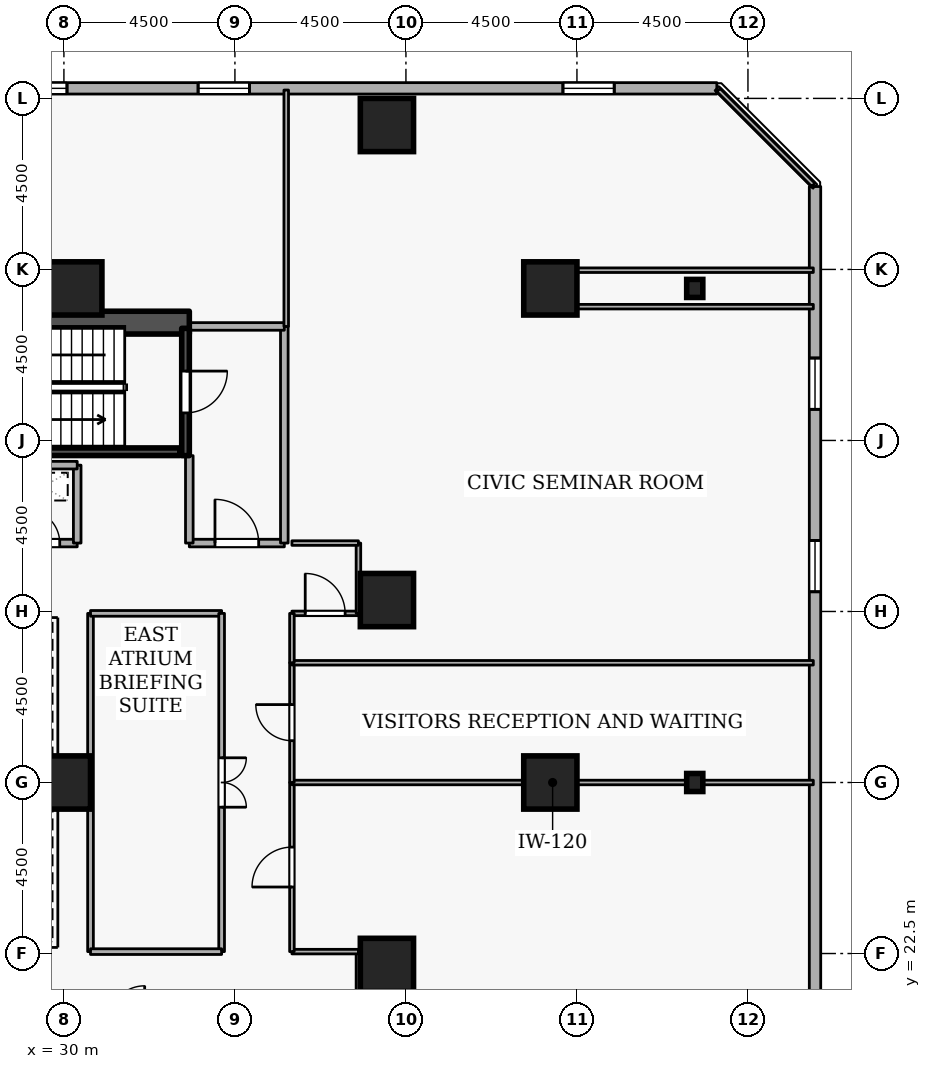
"""IFC4 building model, lengths in metres.
Left out: names, types, materials, properties, quantities, classifications, styles, units other than length and angle.
Written with IfcOpenShell. Run it as: python <this file> out.ifc"""

import sys

from ifc_helpers import new_model, si_unit, direction, frame, frame_2d, origin, origin_2d, place, context, subcontext, project, spatial, rectangle, i_section, extrude, element, fill, save


model = new_model("IFC4")
c1 = context("Model", 3, precision=1e-05, world=origin(), true_north=direction((0.0, 1.0)))
c2 = subcontext(c1, "Body", "Model", "MODEL_VIEW")
j1 = project(units=[si_unit("LENGTHUNIT", "METRE"), si_unit("PLANEANGLEUNIT", "RADIAN")], contexts=[c1])
p1 = place(None, origin())
s1 = spatial("IfcSite", under=j1, at=p1, CompositionType="ELEMENT")
p2 = place(p1, origin())
s2 = spatial("IfcBuilding", under=s1, at=p2, CompositionType="ELEMENT")
p3 = place(p2, frame((0.0, 0.0, 68.1)))
s3 = spatial("IfcBuildingStorey", under=s2, at=p3, CompositionType="ELEMENT", Elevation=68.1)
p4 = place(p3, frame((17.7, 39.1, 0.0), z_axis=(0.0, 0.0, 1.0), x_axis=(1.0, 0.0, 0.0)))
e1 = element("IfcWall", 1, at=p4, inside=s3, PredefinedType="SHEAR", context=c2, shape_type="SweptSolid", body=[
    extrude(rectangle(XDim=15.6, YDim=0.6, at=frame_2d((7.8, 0.0))), origin(), (0.0, 0.0, 1.0), 3.6),
])
for number, where, z_axis, x_axis in (
    (2, (42.8, 27.0, 0.0), (0.0, 0.0, 1.0), (1.0, 0.0, 0.0)),
    (3, (42.8, 40.0, 0.0), (0.0, 0.0, 1.0), (1.0, 0.0, 0.0)),
    (4, (38.5, 44.3, 0.0), (0.0, 0.0, 1.0), (1.0, 0.0, 0.0)),
    (5, (38.5, 22.2, 0.0), (0.0, 0.0, 1.0), (1.0, 0.0, 0.0)),
    (6, (38.5, 31.8, 0.0), (0.0, 0.0, 1.0), (1.0, 0.0, 0.0)),
    (7, (30.3, 40.0, 0.0), (0.0, 0.0, 1.0), (1.0, 0.0, 0.0)),
    (8, (30.0, 27.0, 0.0), (0.0, 0.0, 1.0), (1.0, 0.0, 0.0)),
):
    element("IfcColumn", number, at=place(p3, frame(where, z_axis=z_axis, x_axis=x_axis)), inside=s3, PredefinedType="COLUMN", context=c2, shape_type="SweptSolid", body=[
        extrude(rectangle(XDim=1.4, YDim=1.4, at=origin_2d()), origin(), (0.0, 0.0, 1.0), 3.6),
    ])
for number, where, z_axis, x_axis in (
    (9, (46.6, 27.0, 0.0), (0.0, 0.0, 1.0), (1.0, 0.0, 0.0)),
    (10, (46.6, 40.0, 0.0), (0.0, 0.0, 1.0), (1.0, 0.0, 0.0)),
):
    element("IfcColumn", number, at=place(p3, frame(where, z_axis=z_axis, x_axis=x_axis)), inside=s3, PredefinedType="COLUMN", context=c2, shape_type="SweptSolid", body=[
        extrude(i_section(OverallWidth=0.424, OverallDepth=0.475, WebThickness=0.048, FlangeThickness=0.077, FilletRadius=0.015, at=origin_2d()), origin(), (0.0, 0.0, 1.0), 3.6),
    ])
p5 = place(p3, frame((49.765, 5.319, 0.0), z_axis=(0.0, 0.0, 1.0), x_axis=(0.0, 1.0, 0.0)))
e11 = element("IfcWall", 11, at=p5, inside=s3, PredefinedType="STANDARD", context=c2, shape_type="SweptSolid", body=[
    extrude(rectangle(XDim=37.362, YDim=0.3, at=frame_2d((18.681, 0.0))), origin(), (0.0, 0.0, 1.0), 2.66),
])
p6 = place(p5, frame((2.7, 0.0, 0.72)))
e12 = element("IfcOpeningElement", 12, at=p6, cuts=e11, PredefinedType="OPENING", context=c2, shape_type="SweptSolid", body=[
    extrude(rectangle(XDim=1.35, YDim=1.05, at=frame_2d((0.675, 0.525))), frame((0.0, 0.16, 0.0), z_axis=(0.0, -1.0, 0.0), x_axis=(1.0, 0.0, 0.0)), (0.0, 0.0, 1.0), 0.32),
])
p7 = place(p5, frame((12.3, 0.0, 0.72)))
e13 = element("IfcOpeningElement", 13, at=p7, cuts=e11, PredefinedType="OPENING", context=c2, shape_type="SweptSolid", body=[
    extrude(rectangle(XDim=1.35, YDim=1.05, at=frame_2d((0.675, 0.525))), frame((0.0, 0.16, 0.0), z_axis=(0.0, -1.0, 0.0), x_axis=(1.0, 0.0, 0.0)), (0.0, 0.0, 1.0), 0.32),
])
p8 = place(p5, frame((26.7, 0.0, 0.72)))
e14 = element("IfcOpeningElement", 14, at=p8, cuts=e11, PredefinedType="OPENING", context=c2, shape_type="SweptSolid", body=[
    extrude(rectangle(XDim=1.35, YDim=1.05, at=frame_2d((0.675, 0.525))), frame((0.0, 0.16, 0.0), z_axis=(0.0, -1.0, 0.0), x_axis=(1.0, 0.0, 0.0)), (0.0, 0.0, 1.0), 0.32),
])
p9 = place(p5, frame((31.5, 0.0, 0.72)))
e15 = element("IfcOpeningElement", 15, at=p9, cuts=e11, PredefinedType="OPENING", context=c2, shape_type="SweptSolid", body=[
    extrude(rectangle(XDim=1.35, YDim=1.05, at=frame_2d((0.675, 0.525))), frame((0.0, 0.16, 0.0), z_axis=(0.0, -1.0, 0.0), x_axis=(1.0, 0.0, 0.0)), (0.0, 0.0, 1.0), 0.32),
])
p10 = place(p3, frame((47.181, 45.265, 0.0), z_axis=(0.0, 0.0, 1.0), x_axis=(-1.0, 0.0, 0.0)))
e16 = element("IfcWall", 16, at=p10, inside=s3, PredefinedType="STANDARD", context=c2, shape_type="SweptSolid", body=[
    extrude(rectangle(XDim=37.362, YDim=0.3, at=frame_2d((18.681, 0.0))), origin(), (0.0, 0.0, 1.0), 2.66),
])
p11 = place(p10, frame((2.7, 0.0, 0.72)))
e17 = element("IfcOpeningElement", 17, at=p11, cuts=e16, PredefinedType="OPENING", context=c2, shape_type="SweptSolid", body=[
    extrude(rectangle(XDim=1.35, YDim=1.05, at=frame_2d((0.675, 0.525))), frame((0.0, 0.16, 0.0), z_axis=(0.0, -1.0, 0.0), x_axis=(1.0, 0.0, 0.0)), (0.0, 0.0, 1.0), 0.32),
])
p12 = place(p10, frame((12.3, 0.0, 0.72)))
e18 = element("IfcOpeningElement", 18, at=p12, cuts=e16, PredefinedType="OPENING", context=c2, shape_type="SweptSolid", body=[
    extrude(rectangle(XDim=1.35, YDim=1.05, at=frame_2d((0.675, 0.525))), frame((0.0, 0.16, 0.0), z_axis=(0.0, -1.0, 0.0), x_axis=(1.0, 0.0, 0.0)), (0.0, 0.0, 1.0), 0.32),
])
p13 = place(p10, frame((17.1, 0.0, 0.72)))
e19 = element("IfcOpeningElement", 19, at=p13, cuts=e16, PredefinedType="OPENING", context=c2, shape_type="SweptSolid", body=[
    extrude(rectangle(XDim=1.35, YDim=1.05, at=frame_2d((0.675, 0.525))), frame((0.0, 0.16, 0.0), z_axis=(0.0, -1.0, 0.0), x_axis=(1.0, 0.0, 0.0)), (0.0, 0.0, 1.0), 0.32),
])
p14 = place(p10, frame((26.7, 0.0, 0.72)))
e20 = element("IfcOpeningElement", 20, at=p14, cuts=e16, PredefinedType="OPENING", context=c2, shape_type="SweptSolid", body=[
    extrude(rectangle(XDim=1.35, YDim=1.05, at=frame_2d((0.675, 0.525))), frame((0.0, 0.16, 0.0), z_axis=(0.0, -1.0, 0.0), x_axis=(1.0, 0.0, 0.0)), (0.0, 0.0, 1.0), 0.32),
])
p15 = place(p10, frame((31.5, 0.0, 0.72)))
e21 = element("IfcOpeningElement", 21, at=p15, cuts=e16, PredefinedType="OPENING", context=c2, shape_type="SweptSolid", body=[
    extrude(rectangle(XDim=1.35, YDim=1.05, at=frame_2d((0.675, 0.525))), frame((0.0, 0.16, 0.0), z_axis=(0.0, -1.0, 0.0), x_axis=(1.0, 0.0, 0.0)), (0.0, 0.0, 1.0), 0.32),
])
p16 = place(p3, frame((33.2, 38.95, 0.0), z_axis=(0.0, 0.0, 1.0), x_axis=(0.0, -1.0, 0.0)))
e22 = element("IfcWall", 22, at=p16, inside=s3, PredefinedType="SHEAR", context=c2, shape_type="SweptSolid", body=[
    extrude(rectangle(XDim=3.35, YDim=0.2, at=frame_2d((1.675, 0.0))), origin(), (0.0, 0.0, 1.0), 3.6),
])
p17 = place(p16, frame((1.125, 0.0, 0.0)))
e23 = element("IfcOpeningElement", 23, at=p17, cuts=e22, PredefinedType="OPENING", context=c2, shape_type="SweptSolid", body=[
    extrude(rectangle(XDim=1.1, YDim=2.1, at=frame_2d((0.55, 1.05))), frame((0.0, 0.11, 0.0), z_axis=(0.0, -1.0, 0.0), x_axis=(1.0, 0.0, 0.0)), (0.0, 0.0, 1.0), 0.22),
])
p18 = place(p3, frame((25.95, 35.703, 0.0), z_axis=(0.0, 0.0, 1.0), x_axis=(1.0, 0.0, 0.0)))
e24 = element("IfcWall", 24, at=p18, inside=s3, PredefinedType="SHEAR", context=c2, shape_type="SweptSolid", body=[
    extrude(rectangle(XDim=7.1, YDim=0.2, at=frame_2d((3.55, 0.0))), origin(), (0.0, 0.0, 1.0), 3.6),
])
p19 = place(p3, frame((33.3, 33.3, 0.0), z_axis=(0.0, 0.0, 1.0), x_axis=(1.0, 0.0, 0.0)))
e25 = element("IfcWall", 25, at=p19, inside=s3, PredefinedType="STANDARD", context=c2, shape_type="SweptSolid", body=[
    extrude(rectangle(XDim=2.5, YDim=0.2, at=frame_2d((1.25, 0.0))), origin(), (0.0, 0.0, 1.0), 3.26),
])
p20 = place(p19, frame((0.675, 0.0, 0.0)))
e26 = element("IfcOpeningElement", 26, at=p20, cuts=e25, PredefinedType="OPENING", context=c2, shape_type="SweptSolid", body=[
    extrude(rectangle(XDim=1.15, YDim=2.1, at=frame_2d((0.575, 1.05))), frame((0.0, 0.11, 0.0), z_axis=(0.0, -1.0, 0.0), x_axis=(1.0, 0.0, 0.0)), (0.0, 0.0, 1.0), 0.22),
])
p21 = place(p3, frame((35.8, 33.3, 0.0), z_axis=(0.0, 0.0, 1.0), x_axis=(0.0, 1.0, 0.0)))
e27 = element("IfcWall", 27, at=p21, inside=s3, PredefinedType="STANDARD", context=c2, shape_type="SweptSolid", body=[
    extrude(rectangle(XDim=5.7, YDim=0.2, at=frame_2d((2.85, 0.0))), origin(), (0.0, 0.0, 1.0), 3.26),
])
p22 = place(p3, frame((35.8, 39.0, 0.0), z_axis=(0.0, 0.0, 1.0), x_axis=(-1.0, 0.0, 0.0)))
e28 = element("IfcWall", 28, at=p22, inside=s3, PredefinedType="STANDARD", context=c2, shape_type="SweptSolid", body=[
    extrude(rectangle(XDim=2.5, YDim=0.2, at=frame_2d((1.25, 0.0))), origin(), (0.0, 0.0, 1.0), 3.26),
])
p23 = place(p3, frame((33.3, 35.6, 0.0), z_axis=(0.0, 0.0, 1.0), x_axis=(0.0, -1.0, 0.0)))
e29 = element("IfcWall", 29, at=p23, inside=s3, PredefinedType="STANDARD", context=c2, shape_type="SweptSolid", body=[
    extrude(rectangle(XDim=2.3, YDim=0.2, at=frame_2d((1.15, 0.0))), origin(), (0.0, 0.0, 1.0), 2.465),
])
p24 = place(p3, frame((28.55, 33.3, 0.0), z_axis=(0.0, 0.0, 1.0), x_axis=(1.0, 0.0, 0.0)))
e30 = element("IfcWall", 30, at=p24, inside=s3, PredefinedType="STANDARD", context=c2, shape_type="SweptSolid", body=[
    extrude(rectangle(XDim=1.8, YDim=0.2, at=frame_2d((0.9, 0.0))), origin(), (0.0, 0.0, 1.0), 3.26),
])
p25 = place(p24, frame((0.46, 0.0, 0.0)))
e31 = element("IfcOpeningElement", 31, at=p25, cuts=e30, PredefinedType="OPENING", context=c2, shape_type="SweptSolid", body=[
    extrude(rectangle(XDim=0.88, YDim=2.04, at=frame_2d((0.44, 1.02))), frame((0.0, 0.11, 0.0), z_axis=(0.0, -1.0, 0.0), x_axis=(1.0, 0.0, 0.0)), (0.0, 0.0, 1.0), 0.22),
])
p26 = place(p3, frame((30.35, 33.3, 0.0), z_axis=(0.0, 0.0, 1.0), x_axis=(0.0, 1.0, 0.0)))
e32 = element("IfcWall", 32, at=p26, inside=s3, PredefinedType="STANDARD", context=c2, shape_type="SweptSolid", body=[
    extrude(rectangle(XDim=2.05, YDim=0.2, at=frame_2d((1.025, 0.0))), origin(), (0.0, 0.0, 1.0), 3.26),
])
p27 = place(p3, frame((30.35, 35.35, 0.0), z_axis=(0.0, 0.0, 1.0), x_axis=(-1.0, 0.0, 0.0)))
e33 = element("IfcWall", 33, at=p27, inside=s3, PredefinedType="STANDARD", context=c2, shape_type="SweptSolid", body=[
    extrude(rectangle(XDim=1.8, YDim=0.2, at=frame_2d((0.9, 0.0))), origin(), (0.0, 0.0, 1.0), 3.26),
])
p28 = place(p3, frame((37.75, 20.7, 0.0), z_axis=(0.0, 0.0, 1.0), x_axis=(0.0, 1.0, 0.0)))
e34 = element("IfcWall", 34, at=p28, inside=s3, PredefinedType="PARTITIONING", context=c2, shape_type="SweptSolid", body=[
    extrude(rectangle(XDim=1.85, YDim=0.12, at=frame_2d((0.925, 0.0))), origin(), (0.0, 0.0, 1.0), 3.26),
])
p29 = place(p3, frame((37.75, 22.55, 0.0), z_axis=(0.0, 0.0, 1.0), x_axis=(-1.0, 0.0, 0.0)))
e35 = element("IfcWall", 35, at=p29, inside=s3, PredefinedType="PARTITIONING", context=c2, shape_type="SweptSolid", body=[
    extrude(rectangle(XDim=1.75, YDim=0.12, at=frame_2d((0.875, 0.0))), origin(), (0.0, 0.0, 1.0), 3.26),
])
p30 = place(p3, frame((36.0, 22.55, 0.0), z_axis=(0.0, 0.0, 1.0), x_axis=(0.0, 1.0, 0.0)))
e36 = element("IfcWall", 36, at=p30, inside=s3, PredefinedType="PARTITIONING", context=c2, shape_type="SweptSolid", body=[
    extrude(rectangle(XDim=4.45, YDim=0.12, at=frame_2d((2.225, 0.0))), origin(), (0.0, 0.0, 1.0), 3.26),
])
p31 = place(p30, frame((1.7, 0.0, 0.0)))
e37 = element("IfcOpeningElement", 37, at=p31, cuts=e36, PredefinedType="OPENING", context=c2, shape_type="SweptSolid", body=[
    extrude(rectangle(XDim=1.05, YDim=2.1, at=frame_2d((0.525, 1.05))), frame((0.0, 0.07, 0.0), z_axis=(0.0, -1.0, 0.0), x_axis=(1.0, 0.0, 0.0)), (0.0, 0.0, 1.0), 0.14),
])
p32 = place(p3, frame((36.0, 27.0, 0.0), z_axis=(0.0, 0.0, 1.0), x_axis=(1.0, 0.0, 0.0)))
e38 = element("IfcWall", 38, at=p32, inside=s3, PredefinedType="PARTITIONING", context=c2, shape_type="SweptSolid", body=[
    extrude(rectangle(XDim=13.72, YDim=0.12, at=frame_2d((6.86, 0.0))), origin(), (0.0, 0.0, 1.0), 2.798),
])
p33 = place(p3, frame((36.0, 27.0, 0.0), z_axis=(0.0, 0.0, 1.0), x_axis=(0.0, 1.0, 0.0)))
e39 = element("IfcWall", 39, at=p33, inside=s3, PredefinedType="PARTITIONING", context=c2, shape_type="SweptSolid", body=[
    extrude(rectangle(XDim=3.15, YDim=0.12, at=frame_2d((1.575, 0.0))), origin(), (0.0, 0.0, 1.0), 3.26),
])
p34 = place(p33, frame((1.1, 0.0, 0.0)))
e40 = element("IfcOpeningElement", 40, at=p34, cuts=e39, PredefinedType="OPENING", context=c2, shape_type="SweptSolid", body=[
    extrude(rectangle(XDim=0.95, YDim=2.1, at=frame_2d((0.475, 1.05))), frame((0.0, 0.07, 0.0), z_axis=(0.0, -1.0, 0.0), x_axis=(1.0, 0.0, 0.0)), (0.0, 0.0, 1.0), 0.14),
])
p35 = place(p3, frame((36.0, 30.15, 0.0), z_axis=(0.0, 0.0, 1.0), x_axis=(1.0, 0.0, 0.0)))
e41 = element("IfcWall", 41, at=p35, inside=s3, PredefinedType="PARTITIONING", context=c2, shape_type="SweptSolid", body=[
    extrude(rectangle(XDim=13.72, YDim=0.12, at=frame_2d((6.86, 0.0))), origin(), (0.0, 0.0, 1.0), 3.26),
])
p36 = place(p3, frame((36.0, 31.45, 0.0), z_axis=(0.0, 0.0, 1.0), x_axis=(1.0, 0.0, 0.0)))
e42 = element("IfcWall", 42, at=p36, inside=s3, PredefinedType="PARTITIONING", context=c2, shape_type="SweptSolid", body=[
    extrude(rectangle(XDim=1.75, YDim=0.12, at=frame_2d((0.875, 0.0))), origin(), (0.0, 0.0, 1.0), 3.26),
])
p37 = place(p36, frame((0.35, 0.0, 0.0)))
e43 = element("IfcOpeningElement", 43, at=p37, cuts=e42, PredefinedType="OPENING", context=c2, shape_type="SweptSolid", body=[
    extrude(rectangle(XDim=1.05, YDim=2.1, at=frame_2d((0.525, 1.05))), frame((0.0, 0.07, 0.0), z_axis=(0.0, -1.0, 0.0), x_axis=(1.0, 0.0, 0.0)), (0.0, 0.0, 1.0), 0.14),
])
p38 = place(p3, frame((37.75, 31.45, 0.0), z_axis=(0.0, 0.0, 1.0), x_axis=(0.0, 1.0, 0.0)))
e44 = element("IfcWall", 44, at=p38, inside=s3, PredefinedType="PARTITIONING", context=c2, shape_type="SweptSolid", body=[
    extrude(rectangle(XDim=1.85, YDim=0.12, at=frame_2d((0.925, 0.0))), origin(), (0.0, 0.0, 1.0), 3.26),
])
p39 = place(p3, frame((37.75, 33.3, 0.0), z_axis=(0.0, 0.0, 1.0), x_axis=(-1.0, 0.0, 0.0)))
e45 = element("IfcWall", 45, at=p39, inside=s3, PredefinedType="PARTITIONING", context=c2, shape_type="SweptSolid", body=[
    extrude(rectangle(XDim=1.75, YDim=0.12, at=frame_2d((0.875, 0.0))), origin(), (0.0, 0.0, 1.0), 3.26),
])
p40 = place(p3, frame((35.85, 39.0, 0.0), z_axis=(0.0, 0.0, 1.0), x_axis=(0.0, 1.0, 0.0)))
e46 = element("IfcWall", 46, at=p40, inside=s3, PredefinedType="PARTITIONING", context=c2, shape_type="SweptSolid", body=[
    extrude(rectangle(XDim=6.22, YDim=0.12, at=frame_2d((3.11, 0.0))), origin(), (0.0, 0.0, 1.0), 3.26),
])
p41 = place(p3, frame((47.225, 45.22, 0.0), z_axis=(0.0, 0.0, 1.0), x_axis=(0.707106781187, -0.707106781187, 0.0)))
e47 = element("IfcWall", 47, at=p41, inside=s3, PredefinedType="PARTITIONING", context=c2, shape_type="SweptSolid", body=[
    extrude(rectangle(XDim=3.528, YDim=0.12, at=frame_2d((1.764, 0.0))), origin(), (0.0, 0.0, 1.0), 3.26),
])
p42 = place(p3, frame((49.72, 40.48, 0.0), z_axis=(0.0, 0.0, 1.0), x_axis=(-1.0, 0.0, 0.0)))
e48 = element("IfcWall", 48, at=p42, inside=s3, PredefinedType="PARTITIONING", context=c2, shape_type="SweptSolid", body=[
    extrude(rectangle(XDim=6.92, YDim=0.12, at=frame_2d((3.46, 0.0))), origin(), (0.0, 0.0, 1.0), 2.815),
])
p43 = place(p3, frame((42.8, 39.52, 0.0), z_axis=(0.0, 0.0, 1.0), x_axis=(1.0, 0.0, 0.0)))
e49 = element("IfcWall", 49, at=p43, inside=s3, PredefinedType="PARTITIONING", context=c2, shape_type="SweptSolid", body=[
    extrude(rectangle(XDim=6.92, YDim=0.12, at=frame_2d((3.46, 0.0))), origin(), (0.0, 0.0, 1.0), 3.26),
])
p44 = place(p3, frame((36.0, 30.15, 0.0), z_axis=(0.0, 0.0, 1.0), x_axis=(0.0, 1.0, 0.0)))
e50 = element("IfcWall", 50, at=p44, inside=s3, PredefinedType="PARTITIONING", context=c2, shape_type="SweptSolid", body=[
    extrude(rectangle(XDim=1.3, YDim=0.12, at=frame_2d((0.65, 0.0))), origin(), (0.0, 0.0, 1.0), 3.26),
])
p45 = place(p3, frame((30.7, 22.55, 0.0), z_axis=(0.0, 0.0, 1.0), x_axis=(0.0, 1.0, 0.0)))
e51 = element("IfcWall", 51, at=p45, inside=s3, PredefinedType="PARTITIONING", context=c2, shape_type="SweptSolid", body=[
    extrude(rectangle(XDim=8.9, YDim=0.15, at=frame_2d((4.45, 0.0))), origin(), (0.0, 0.0, 1.0), 3.26),
])
p46 = place(p3, frame((30.7, 31.45, 0.0), z_axis=(0.0, 0.0, 1.0), x_axis=(1.0, 0.0, 0.0)))
e52 = element("IfcWall", 52, at=p46, inside=s3, PredefinedType="PARTITIONING", context=c2, shape_type="SweptSolid", body=[
    extrude(rectangle(XDim=3.45, YDim=0.15, at=frame_2d((1.725, 0.0))), origin(), (0.0, 0.0, 1.0), 3.26),
])
p47 = place(p3, frame((34.15, 31.45, 0.0), z_axis=(0.0, 0.0, 1.0), x_axis=(0.0, -1.0, 0.0)))
e53 = element("IfcWall", 53, at=p47, inside=s3, PredefinedType="PARTITIONING", context=c2, shape_type="SweptSolid", body=[
    extrude(rectangle(XDim=8.9, YDim=0.15, at=frame_2d((4.45, 0.0))), origin(), (0.0, 0.0, 1.0), 3.26),
])
p48 = place(p47, frame((3.8, 0.0, 0.0)))
e54 = element("IfcOpeningElement", 54, at=p48, cuts=e53, PredefinedType="OPENING", context=c2, shape_type="SweptSolid", body=[
    extrude(rectangle(XDim=1.3, YDim=2.12, at=frame_2d((0.65, 1.06))), frame((0.0, 0.085, 0.0), z_axis=(0.0, -1.0, 0.0), x_axis=(1.0, 0.0, 0.0)), (0.0, 0.0, 1.0), 0.17),
])
p49 = place(p3, frame((34.15, 22.55, 0.0), z_axis=(0.0, 0.0, 1.0), x_axis=(-1.0, 0.0, 0.0)))
e55 = element("IfcWall", 55, at=p49, inside=s3, PredefinedType="PARTITIONING", context=c2, shape_type="SweptSolid", body=[
    extrude(rectangle(XDim=3.45, YDim=0.15, at=frame_2d((1.725, 0.0))), origin(), (0.0, 0.0, 1.0), 3.26),
])
p50 = place(p8, origin())
e56 = element("IfcWindow", 56, at=p50, inside=s3, PartitioningType="SINGLE_PANEL", PredefinedType="WINDOW", context=c2, shape_type="SweptSolid", body=[
    extrude(rectangle(XDim=1.35, YDim=1.05, at=frame_2d((0.675, 0.525))), frame((0.0, 0.03, 0.0), z_axis=(0.0, -1.0, 0.0), x_axis=(1.0, 0.0, 0.0)), (0.0, 0.0, 1.0), 0.06),
])
fill(e14, e56)
p51 = place(p9, origin())
e57 = element("IfcWindow", 57, at=p51, inside=s3, PartitioningType="SINGLE_PANEL", PredefinedType="WINDOW", context=c2, shape_type="SweptSolid", body=[
    extrude(rectangle(XDim=1.35, YDim=1.05, at=frame_2d((0.675, 0.525))), frame((0.0, 0.03, 0.0), z_axis=(0.0, -1.0, 0.0), x_axis=(1.0, 0.0, 0.0)), (0.0, 0.0, 1.0), 0.06),
])
fill(e15, e57)
p52 = place(p11, origin())
e58 = element("IfcWindow", 58, at=p52, inside=s3, PartitioningType="SINGLE_PANEL", PredefinedType="WINDOW", context=c2, shape_type="SweptSolid", body=[
    extrude(rectangle(XDim=1.35, YDim=1.05, at=frame_2d((0.675, 0.525))), frame((0.0, 0.03, 0.0), z_axis=(0.0, -1.0, 0.0), x_axis=(1.0, 0.0, 0.0)), (0.0, 0.0, 1.0), 0.06),
])
fill(e17, e58)
p53 = place(p12, origin())
e59 = element("IfcWindow", 59, at=p53, inside=s3, PartitioningType="SINGLE_PANEL", PredefinedType="WINDOW", context=c2, shape_type="SweptSolid", body=[
    extrude(rectangle(XDim=1.35, YDim=1.05, at=frame_2d((0.675, 0.525))), frame((0.0, 0.03, 0.0), z_axis=(0.0, -1.0, 0.0), x_axis=(1.0, 0.0, 0.0)), (0.0, 0.0, 1.0), 0.06),
])
fill(e18, e59)
p54 = place(p13, origin())
e60 = element("IfcWindow", 60, at=p54, inside=s3, PartitioningType="SINGLE_PANEL", PredefinedType="WINDOW", context=c2, shape_type="SweptSolid", body=[
    extrude(rectangle(XDim=1.35, YDim=1.05, at=frame_2d((0.675, 0.525))), frame((0.0, 0.03, 0.0), z_axis=(0.0, -1.0, 0.0), x_axis=(1.0, 0.0, 0.0)), (0.0, 0.0, 1.0), 0.06),
])
fill(e19, e60)
p55 = place(p17, origin())
e61 = element("IfcDoor", 61, at=p55, inside=s3, OperationType="SINGLE_SWING_LEFT", PredefinedType="DOOR", context=c2, shape_type="SweptSolid", body=[
    extrude(rectangle(XDim=1.1, YDim=2.1, at=frame_2d((0.55, 1.05))), frame((0.0, 0.025, 0.0), z_axis=(0.0, -1.0, 0.0), x_axis=(1.0, 0.0, 0.0)), (0.0, 0.0, 1.0), 0.05),
])
fill(e23, e61)
p56 = place(p20, origin())
e62 = element("IfcDoor", 62, at=p56, inside=s3, OperationType="SINGLE_SWING_LEFT", PredefinedType="DOOR", context=c2, shape_type="SweptSolid", body=[
    extrude(rectangle(XDim=1.15, YDim=2.1, at=frame_2d((0.575, 1.05))), frame((0.0, 0.025, 0.0), z_axis=(0.0, -1.0, 0.0), x_axis=(1.0, 0.0, 0.0)), (0.0, 0.0, 1.0), 0.05),
])
fill(e26, e62)
p57 = place(p25, origin())
e63 = element("IfcDoor", 63, at=p57, inside=s3, OperationType="SINGLE_SWING_LEFT", PredefinedType="DOOR", context=c2, shape_type="SweptSolid", body=[
    extrude(rectangle(XDim=0.88, YDim=2.04, at=frame_2d((0.44, 1.02))), frame((0.0, 0.025, 0.0), z_axis=(0.0, -1.0, 0.0), x_axis=(1.0, 0.0, 0.0)), (0.0, 0.0, 1.0), 0.05),
])
fill(e31, e63)
p58 = place(p31, origin())
e64 = element("IfcDoor", 64, at=p58, inside=s3, OperationType="SINGLE_SWING_LEFT", PredefinedType="DOOR", context=c2, shape_type="SweptSolid", body=[
    extrude(rectangle(XDim=1.05, YDim=2.1, at=frame_2d((0.525, 1.05))), frame((0.0, 0.025, 0.0), z_axis=(0.0, -1.0, 0.0), x_axis=(1.0, 0.0, 0.0)), (0.0, 0.0, 1.0), 0.05),
])
fill(e37, e64)
p59 = place(p34, origin())
e65 = element("IfcDoor", 65, at=p59, inside=s3, OperationType="SINGLE_SWING_RIGHT", PredefinedType="DOOR", context=c2, shape_type="SweptSolid", body=[
    extrude(rectangle(XDim=0.95, YDim=2.1, at=frame_2d((0.475, 1.05))), frame((0.0, 0.025, 0.0), z_axis=(0.0, -1.0, 0.0), x_axis=(1.0, 0.0, 0.0)), (0.0, 0.0, 1.0), 0.05),
])
fill(e40, e65)
p60 = place(p37, origin())
e66 = element("IfcDoor", 66, at=p60, inside=s3, OperationType="SINGLE_SWING_LEFT", PredefinedType="DOOR", context=c2, shape_type="SweptSolid", body=[
    extrude(rectangle(XDim=1.05, YDim=2.1, at=frame_2d((0.525, 1.05))), frame((0.0, 0.025, 0.0), z_axis=(0.0, -1.0, 0.0), x_axis=(1.0, 0.0, 0.0)), (0.0, 0.0, 1.0), 0.05),
])
fill(e43, e66)
p61 = place(p48, origin())
e67 = element("IfcDoor", 67, at=p61, inside=s3, OperationType="DOUBLE_DOOR_SINGLE_SWING", PredefinedType="DOOR", context=c2, shape_type="SweptSolid", body=[
    extrude(rectangle(XDim=1.3, YDim=2.12, at=frame_2d((0.65, 1.06))), frame((0.0, 0.025, 0.0), z_axis=(0.0, -1.0, 0.0), x_axis=(1.0, 0.0, 0.0)), (0.0, 0.0, 1.0), 0.05),
])
fill(e54, e67)
save(model, sys.argv[1])
